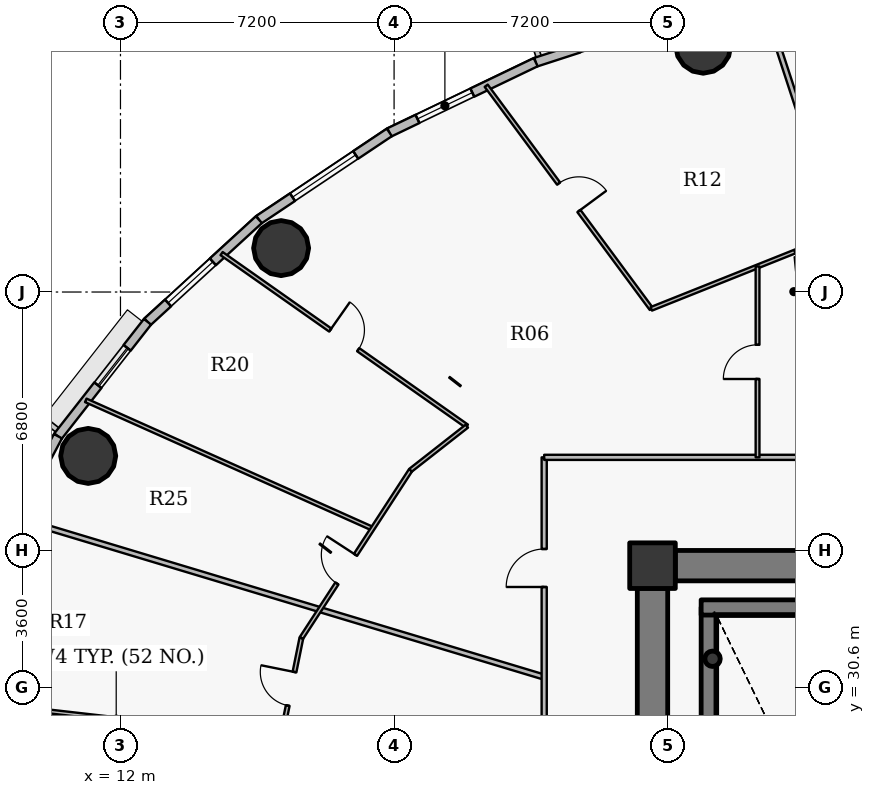
"""IFC4 building model, lengths in metres.
Left out: names, types, materials, properties, quantities, classifications, styles, units other than length and angle.
Written with IfcOpenShell. Run it as: python <this file> out.ifc"""

import sys

from ifc_helpers import new_model, si_unit, direction, frame, frame_2d, origin, origin_2d, place, context, subcontext, project, spatial, rectangle, hollow_circle, extrude, source, transform, mapped, element, fill, save


model = new_model("IFC4")
c1 = context("Model", 3, precision=1e-05, world=origin(), true_north=direction((0.0, 1.0)))
c2 = subcontext(c1, "Body", "Model", "MODEL_VIEW")
j1 = project(units=[si_unit("LENGTHUNIT", "METRE"), si_unit("PLANEANGLEUNIT", "RADIAN")], contexts=[c1])
p1 = place(None, origin())
s1 = spatial("IfcSite", under=j1, at=p1, CompositionType="ELEMENT")
p2 = place(p1, origin())
s2 = spatial("IfcBuilding", under=s1, at=p2, CompositionType="ELEMENT")
p3 = place(p2, frame((0.0, 0.0, 112.2)))
s3 = spatial("IfcBuildingStorey", under=s2, at=p3, CompositionType="ELEMENT", Elevation=112.2)
p4 = place(p3, frame((26.0, 33.8, 0.0), z_axis=(0.0, 0.0, 1.0), x_axis=(1.0, 0.0, 0.0)))
e1 = element("IfcColumn", 1, at=p4, inside=s3, PredefinedType="COLUMN", context=c2, shape_type="SweptSolid", body=[
    extrude(rectangle(XDim=1.2, YDim=1.2, at=origin_2d()), origin(), (0.0, 0.0, 1.0), 3.75),
])
p5 = place(p3, frame((27.48, 24.1, 0.0), z_axis=(0.0, 0.0, 1.0), x_axis=(0.0, 1.0, 0.0)))
e2 = element("IfcWall", 2, at=p5, inside=s3, PredefinedType="SHEAR", context=c2, shape_type="SweptSolid", body=[
    extrude(rectangle(XDim=8.6, YDim=0.4, at=frame_2d((4.3, 0.0))), origin(), (0.0, 0.0, 1.0), 3.75),
])
p6 = place(p3, frame((27.28, 32.7, 0.0), z_axis=(0.0, 0.0, 1.0), x_axis=(1.0, 0.0, 0.0)))
e3 = element("IfcWall", 3, at=p6, inside=s3, PredefinedType="SHEAR", context=c2, shape_type="SweptSolid", body=[
    extrude(rectangle(XDim=4.1, YDim=0.4, at=frame_2d((2.05, 0.0))), origin(), (0.0, 0.0, 1.0), 3.75),
])
p7 = place(p3, frame((27.58, 31.35, 0.0), z_axis=(0.0, 0.0, 1.0), x_axis=(1.0, 0.0, 0.0)))
e4 = element("IfcColumn", 4, at=p7, inside=s3, PredefinedType="COLUMN", context=c2, shape_type="SweptSolid", body=[
    extrude(hollow_circle(Radius=0.203, WallThickness=0.016, at=origin_2d()), origin(), (0.0, 0.0, 1.0), 3.75),
])
p8 = place(p3, frame((26.6, 33.8, 0.0), z_axis=(0.0, 0.0, 1.0), x_axis=(1.0, 0.0, 0.0)))
e5 = element("IfcWall", 5, at=p8, inside=s3, PredefinedType="SHEAR", context=c2, shape_type="SweptSolid", body=[
    extrude(rectangle(XDim=18.8, YDim=0.8, at=frame_2d((9.4, 0.0))), origin(), (0.0, 0.0, 1.0), 2.95),
])
p9 = place(p3, frame((26.0, 20.8, 0.0), z_axis=(0.0, 0.0, 1.0), x_axis=(0.0, 1.0, 0.0)))
e6 = element("IfcWall", 6, at=p9, inside=s3, PredefinedType="SHEAR", context=c2, shape_type="SweptSolid", body=[
    extrude(rectangle(XDim=12.4, YDim=0.8, at=frame_2d((6.2, 0.0))), origin(), (0.0, 0.0, 1.0), 2.95),
])
p10 = place(p9, frame((5.79, 0.0, 0.0)))
e7 = element("IfcOpeningElement", 7, at=p10, cuts=e6, PredefinedType="OPENING", context=c2, shape_type="SweptSolid", body=[
    extrude(rectangle(XDim=0.82, YDim=2.1, at=origin_2d()), frame((0.41, 0.41, 1.05), z_axis=(0.0, -1.0, 0.0), x_axis=(1.0, 0.0, 0.0)), (0.0, 0.0, 1.0), 0.82),
])
for number, where, z_axis, x_axis in (
    (8, (27.334, 47.481, 0.0), (0.0, 0.0, 1.0), (1.0, 0.0, 0.0)),
    (9, (16.227, 42.156, 0.0), (0.0, 0.0, 1.0), (1.0, 0.0, 0.0)),
    (10, (11.151, 36.688, 0.0), (0.0, 0.0, 1.0), (1.0, 0.0, 0.0)),
):
    element("IfcColumn", number, at=place(p3, frame(where, z_axis=z_axis, x_axis=x_axis)), inside=s3, PredefinedType="COLUMN", context=c2, shape_type="SweptSolid", body=[
        extrude(hollow_circle(Radius=0.725, WallThickness=0.042, at=origin_2d()), origin(), (0.0, 0.0, 1.0), 3.75),
    ])
p11 = place(p3, frame((22.926, 47.047, 0.0), z_axis=(0.0, 0.0, 1.0), x_axis=(0.951211346073, 0.308540070495, 0.0)))
e11 = element("IfcWall", 11, at=p11, inside=s3, PredefinedType="SOLIDWALL", context=c2, shape_type="SweptSolid", body=[
    extrude(rectangle(XDim=4.388, YDim=0.24, at=frame_2d((2.194, 0.0))), origin(), (0.0, 0.0, 1.0), 3.5),
])
p12 = place(p11, frame((1.194, 0.0, 0.9)))
e12 = element("IfcOpeningElement", 12, at=p12, cuts=e11, PredefinedType="OPENING", context=c2, shape_type="SweptSolid", body=[
    extrude(rectangle(XDim=2.0, YDim=1.75, at=origin_2d()), frame((1.0, 0.13, 0.875), z_axis=(0.0, -1.0, 0.0), x_axis=(1.0, 0.0, 0.0)), (0.0, 0.0, 1.0), 0.26),
])
p13 = place(p3, frame((19.075, 45.199, 0.0), z_axis=(0.0, 0.0, 1.0), x_axis=(0.901589935876, 0.432591709962, 0.0)))
e13 = element("IfcWall", 13, at=p13, inside=s3, PredefinedType="SOLIDWALL", context=c2, shape_type="SweptSolid", body=[
    extrude(rectangle(XDim=4.272, YDim=0.24, at=frame_2d((2.136, 0.0))), origin(), (0.0, 0.0, 1.0), 3.5),
])
p14 = place(p13, frame((0.822, 0.0, 0.9)))
e14 = element("IfcOpeningElement", 14, at=p14, cuts=e13, PredefinedType="OPENING", context=c2, shape_type="SweptSolid", body=[
    extrude(rectangle(XDim=1.6, YDim=1.75, at=origin_2d()), frame((0.8, 0.13, 0.875), z_axis=(0.0, -1.0, 0.0), x_axis=(1.0, 0.0, 0.0)), (0.0, 0.0, 1.0), 0.26),
])
p15 = place(p3, frame((15.642, 42.903, 0.0), z_axis=(0.0, 0.0, 1.0), x_axis=(0.831221811447, 0.555940914284, 0.0)))
e15 = element("IfcWall", 15, at=p15, inside=s3, PredefinedType="SOLIDWALL", context=c2, shape_type="SweptSolid", body=[
    extrude(rectangle(XDim=4.13, YDim=0.24, at=frame_2d((2.065, 0.0))), origin(), (0.0, 0.0, 1.0), 3.5),
])
p16 = place(p15, frame((1.065, 0.0, 0.9)))
e16 = element("IfcOpeningElement", 16, at=p16, cuts=e15, PredefinedType="OPENING", context=c2, shape_type="SweptSolid", body=[
    extrude(rectangle(XDim=2.0, YDim=1.75, at=origin_2d()), frame((1.0, 0.13, 0.875), z_axis=(0.0, -1.0, 0.0), x_axis=(1.0, 0.0, 0.0)), (0.0, 0.0, 1.0), 0.26),
])
p17 = place(p3, frame((12.711, 40.217, 0.0), z_axis=(0.0, 0.0, 1.0), x_axis=(0.737113356241, 0.675769117414, 0.0)))
e17 = element("IfcWall", 17, at=p17, inside=s3, PredefinedType="SOLIDWALL", context=c2, shape_type="SweptSolid", body=[
    extrude(rectangle(XDim=3.976, YDim=0.24, at=frame_2d((1.988, 0.0))), origin(), (0.0, 0.0, 1.0), 3.5),
])
p18 = place(p17, frame((0.734, 0.0, 0.9)))
e18 = element("IfcOpeningElement", 18, at=p18, cuts=e17, PredefinedType="OPENING", context=c2, shape_type="SweptSolid", body=[
    extrude(rectangle(XDim=1.6, YDim=1.75, at=origin_2d()), frame((0.8, 0.13, 0.875), z_axis=(0.0, -1.0, 0.0), x_axis=(1.0, 0.0, 0.0)), (0.0, 0.0, 1.0), 0.26),
])
p19 = place(p3, frame((10.355, 37.206, 0.0), z_axis=(0.0, 0.0, 1.0), x_axis=(0.616272103517, 0.787533297345, 0.0)))
e19 = element("IfcWall", 19, at=p19, inside=s3, PredefinedType="SOLIDWALL", context=c2, shape_type="SweptSolid", body=[
    extrude(rectangle(XDim=3.823, YDim=0.24, at=frame_2d((1.912, 0.0))), origin(), (0.0, 0.0, 1.0), 3.5),
])
p20 = place(p19, frame((1.705, 0.0, 0.9)))
e20 = element("IfcOpeningElement", 20, at=p20, cuts=e19, PredefinedType="OPENING", context=c2, shape_type="SweptSolid", body=[
    extrude(rectangle(XDim=1.25, YDim=1.65, at=origin_2d()), frame((0.625, 0.13, 0.825), z_axis=(0.0, -1.0, 0.0), x_axis=(1.0, 0.0, 0.0)), (0.0, 0.0, 1.0), 0.26),
])
p21 = place(p3, frame((8.63, 33.945, 0.0), z_axis=(0.0, 0.0, 1.0), x_axis=(0.467614004126, 0.883932770716, 0.0)))
e21 = element("IfcWall", 21, at=p21, inside=s3, PredefinedType="SOLIDWALL", context=c2, shape_type="SweptSolid", body=[
    extrude(rectangle(XDim=3.689, YDim=0.24, at=frame_2d((1.844, 0.0))), origin(), (0.0, 0.0, 1.0), 3.5),
])
p22 = place(p3, frame((7.548, 30.259, 0.0), z_axis=(0.0, 0.0, 1.0), x_axis=(0.993502465776, -0.11381059044, 0.0)))
e22 = element("IfcWall", 22, at=p22, inside=s3, PredefinedType="PARTITIONING", context=c2, shape_type="SweptSolid", body=[
    extrude(rectangle(XDim=8.737, YDim=0.1, at=frame_2d((4.369, 0.0))), origin(), (0.0, 0.0, 1.0), 2.935),
])
p23 = place(p3, frame((9.215, 35.062, 0.0), z_axis=(0.0, 0.0, 1.0), x_axis=(0.957569176287, -0.288203526393, 0.0)))
e23 = element("IfcWall", 23, at=p23, inside=s3, PredefinedType="PARTITIONING", context=c2, shape_type="SweptSolid", body=[
    extrude(rectangle(XDim=14.552, YDim=0.135, at=frame_2d((7.276, 0.0))), origin(), (0.0, 0.0, 1.0), 2.935),
])
p24 = place(p3, frame((11.087, 38.15, 0.0), z_axis=(0.0, 0.0, 1.0), x_axis=(0.912756243594, -0.408504638627, 0.0)))
e24 = element("IfcWall", 24, at=p24, inside=s3, PredefinedType="PARTITIONING", context=c2, shape_type="SweptSolid", body=[
    extrude(rectangle(XDim=8.267, YDim=0.1, at=frame_2d((4.133, 0.0))), origin(), (0.0, 0.0, 1.0), 2.935),
])
p25 = place(p3, frame((14.661, 42.011, 0.0), z_axis=(0.0, 0.0, 1.0), x_axis=(0.817899711196, -0.575360810645, 0.0)))
e25 = element("IfcWall", 25, at=p25, inside=s3, PredefinedType="PARTITIONING", context=c2, shape_type="SweptSolid", body=[
    extrude(rectangle(XDim=7.891, YDim=0.1, at=frame_2d((3.945, 0.0))), origin(), (0.0, 0.0, 1.0), 2.935),
])
p26 = place(p25, frame((3.495, 0.0, 0.0)))
e26 = element("IfcOpeningElement", 26, at=p26, cuts=e25, PredefinedType="OPENING", context=c2, shape_type="SweptSolid", body=[
    extrude(rectangle(XDim=0.9, YDim=2.1, at=origin_2d()), frame((0.45, 0.06, 1.05), z_axis=(0.0, -1.0, 0.0), x_axis=(1.0, 0.0, 0.0)), (0.0, 0.0, 1.0), 0.12),
])
p27 = place(p3, frame((15.77, 27.0, 0.0), z_axis=(0.0, 0.0, 1.0), x_axis=(0.19822142127, 0.980157267049, 0.0)))
e27 = element("IfcWall", 27, at=p27, inside=s3, PredefinedType="PARTITIONING", context=c2, shape_type="SweptSolid", body=[
    extrude(rectangle(XDim=4.994, YDim=0.1, at=frame_2d((2.497, 0.0))), origin(), (0.0, 0.0, 1.0), 2.935),
])
p28 = place(p27, frame((3.183, 0.0, 0.0)))
e28 = element("IfcOpeningElement", 28, at=p28, cuts=e27, PredefinedType="OPENING", context=c2, shape_type="SweptSolid", body=[
    extrude(rectangle(XDim=0.9, YDim=2.1, at=origin_2d()), frame((0.45, 0.06, 1.05), z_axis=(0.0, -1.0, 0.0), x_axis=(1.0, 0.0, 0.0)), (0.0, 0.0, 1.0), 0.12),
])
p29 = place(p27, frame((0.725, 0.0, 0.0)))
e29 = element("IfcOpeningElement", 29, at=p29, cuts=e27, PredefinedType="OPENING", context=c2, shape_type="SweptSolid", body=[
    extrude(rectangle(XDim=0.9, YDim=2.1, at=origin_2d()), frame((0.45, 0.06, 1.05), z_axis=(0.0, -1.0, 0.0), x_axis=(1.0, 0.0, 0.0)), (0.0, 0.0, 1.0), 0.12),
])
p30 = place(p3, frame((16.76, 31.895, 0.0), z_axis=(0.0, 0.0, 1.0), x_axis=(0.545405249109, 0.838172484781, 0.0)))
e30 = element("IfcWall", 30, at=p30, inside=s3, PredefinedType="PARTITIONING", context=c2, shape_type="SweptSolid", body=[
    extrude(rectangle(XDim=5.269, YDim=0.1, at=frame_2d((2.634, 0.0))), origin(), (0.0, 0.0, 1.0), 2.935),
])
p31 = place(p30, frame((1.713, 0.0, 0.0)))
e31 = element("IfcOpeningElement", 31, at=p31, cuts=e30, PredefinedType="OPENING", context=c2, shape_type="SweptSolid", body=[
    extrude(rectangle(XDim=0.9, YDim=2.1, at=origin_2d()), frame((0.45, 0.06, 1.05), z_axis=(0.0, -1.0, 0.0), x_axis=(1.0, 0.0, 0.0)), (0.0, 0.0, 1.0), 0.12),
])
p32 = place(p3, frame((19.634, 36.311, 0.0), z_axis=(0.0, 0.0, 1.0), x_axis=(0.787307829703, 0.616560119768, 0.0)))
e32 = element("IfcWall", 32, at=p32, inside=s3, PredefinedType="PARTITIONING", context=c2, shape_type="SweptSolid", body=[
    extrude(rectangle(XDim=1.882, YDim=0.1, at=frame_2d((0.941, 0.0))), origin(), (0.0, 0.0, 1.0), 3.5),
])
p33 = place(p3, frame((21.624, 46.428, 0.0), z_axis=(0.0, 0.0, 1.0), x_axis=(0.594804555611, -0.803870350631, 0.0)))
e33 = element("IfcWall", 33, at=p33, inside=s3, PredefinedType="PARTITIONING", context=c2, shape_type="SweptSolid", body=[
    extrude(rectangle(XDim=7.303, YDim=0.1, at=frame_2d((3.652, 0.0))), origin(), (0.0, 0.0, 1.0), 2.935),
])
p34 = place(p33, frame((3.202, 0.0, 0.0)))
e34 = element("IfcOpeningElement", 34, at=p34, cuts=e33, PredefinedType="OPENING", context=c2, shape_type="SweptSolid", body=[
    extrude(rectangle(XDim=0.9, YDim=2.1, at=origin_2d()), frame((0.45, 0.06, 1.05), z_axis=(0.0, -1.0, 0.0), x_axis=(1.0, 0.0, 0.0)), (0.0, 0.0, 1.0), 0.12),
])
p35 = place(p3, frame((23.15, 17.35, 0.0), z_axis=(0.0, 0.0, 1.0), x_axis=(0.0, 1.0, 0.0)))
e35 = element("IfcWall", 35, at=p35, inside=s3, PredefinedType="PARTITIONING", context=c2, shape_type="SweptSolid", body=[
    extrude(rectangle(XDim=19.3, YDim=0.135, at=frame_2d((9.65, 0.0))), origin(), (0.0, 0.0, 1.0), 2.935),
])
p36 = place(p35, frame((15.889, 0.0, 0.0)))
e36 = element("IfcOpeningElement", 36, at=p36, cuts=e35, PredefinedType="OPENING", context=c2, shape_type="SweptSolid", body=[
    extrude(rectangle(XDim=1.0, YDim=2.15, at=origin_2d()), frame((0.5, 0.078, 1.075), z_axis=(0.0, -1.0, 0.0), x_axis=(1.0, 0.0, 0.0)), (0.0, 0.0, 1.0), 0.155),
])
p37 = place(p35, frame((6.279, 0.0, 0.0)))
e37 = element("IfcOpeningElement", 37, at=p37, cuts=e35, PredefinedType="OPENING", context=c2, shape_type="SweptSolid", body=[
    extrude(rectangle(XDim=1.0, YDim=2.15, at=origin_2d()), frame((0.5, 0.078, 1.075), z_axis=(0.0, -1.0, 0.0), x_axis=(1.0, 0.0, 0.0)), (0.0, 0.0, 1.0), 0.155),
])
p38 = place(p3, frame((23.15, 36.65, 0.0), z_axis=(0.0, 0.0, 1.0), x_axis=(1.0, 0.0, 0.0)))
e38 = element("IfcWall", 38, at=p38, inside=s3, PredefinedType="PARTITIONING", context=c2, shape_type="SweptSolid", body=[
    extrude(rectangle(XDim=10.373, YDim=0.135, at=frame_2d((5.187, 0.0))), origin(), (0.0, 0.0, 1.0), 2.935),
])
p39 = place(p3, frame((25.968, 40.557, 0.0), z_axis=(0.0, 0.0, 1.0), x_axis=(0.928807252466, 0.37056320347, 0.0)))
e39 = element("IfcWall", 39, at=p39, inside=s3, PredefinedType="PARTITIONING", context=c2, shape_type="SweptSolid", body=[
    extrude(rectangle(XDim=4.07, YDim=0.1, at=frame_2d((2.035, 0.0))), origin(), (0.0, 0.0, 1.0), 2.935),
])
p40 = place(p3, frame((28.764, 36.65, 0.0), z_axis=(0.0, 0.0, 1.0), x_axis=(0.0, 1.0, 0.0)))
e40 = element("IfcWall", 40, at=p40, inside=s3, PredefinedType="PARTITIONING", context=c2, shape_type="SweptSolid", body=[
    extrude(rectangle(XDim=5.023, YDim=0.1, at=frame_2d((2.511, 0.0))), origin(), (0.0, 0.0, 1.0), 3.5),
])
p41 = place(p40, frame((2.062, 0.0, 0.0)))
e41 = element("IfcOpeningElement", 41, at=p41, cuts=e40, PredefinedType="OPENING", context=c2, shape_type="SweptSolid", body=[
    extrude(rectangle(XDim=0.9, YDim=2.1, at=origin_2d()), frame((0.45, 0.06, 1.05), z_axis=(0.0, -1.0, 0.0), x_axis=(1.0, 0.0, 0.0)), (0.0, 0.0, 1.0), 0.12),
])
p42 = place(p3, frame((28.883, 48.741, 0.0), z_axis=(0.0, 0.0, 1.0), x_axis=(0.311090320612, -0.95038035145, 0.0)))
e42 = element("IfcWall", 42, at=p42, inside=s3, PredefinedType="PARTITIONING", context=c2, shape_type="SweptSolid", body=[
    extrude(rectangle(XDim=12.671, YDim=0.135, at=frame_2d((6.335, 0.0))), origin(), (0.0, 0.0, 1.0), 2.935),
])
p43 = place(p3, frame((29.749, 42.066, 0.0), z_axis=(0.0, 0.0, 1.0), x_axis=(0.992395485088, 0.123090215599, 0.0)))
e43 = element("IfcWall", 43, at=p43, inside=s3, PredefinedType="PARTITIONING", context=c2, shape_type="SweptSolid", body=[
    extrude(rectangle(XDim=6.299, YDim=0.1, at=frame_2d((3.15, 0.0))), origin(), (0.0, 0.0, 1.0), 2.935),
])
p44 = place(p3, frame((26.59, 34.2, 0.0), z_axis=(0.0, 0.0, 1.0), x_axis=(-1.0, 0.0, 0.0)))
e44 = element("IfcWall", 44, at=p44, inside=s3, PredefinedType="PARTITIONING", context=c2, shape_type="SweptSolid", body=[
    extrude(rectangle(XDim=0.99, YDim=0.135, at=frame_2d((0.495, 0.0))), origin(), (0.0, 0.0, 1.0), 2.935),
])
p45 = place(p3, frame((25.6, 33.893, 0.0), z_axis=(0.0, 0.0, 1.0), x_axis=(0.0, -1.0, 0.0)))
e45 = element("IfcWall", 45, at=p45, inside=s3, PredefinedType="PARTITIONING", context=c2, shape_type="SweptSolid", body=[
    extrude(rectangle(XDim=0.683, YDim=0.135, at=frame_2d((0.341, 0.0))), origin(), (0.0, 0.0, 1.0), 3.5),
])
m1 = source(origin(), c2, "Body", "SweptSolid", [
    extrude(rectangle(XDim=1.6, YDim=1.75, at=origin_2d()), frame((0.8, 0.03, 0.875), z_axis=(0.0, -1.0, 0.0), x_axis=(1.0, 0.0, 0.0)), (0.0, 0.0, 1.0), 0.06),
])
p46 = place(p14, origin())
e46 = element("IfcWindow", 46, at=p46, inside=s3, PartitioningType="DOUBLE_PANEL_VERTICAL", PredefinedType="WINDOW", context=c2, shape_type="MappedRepresentation", body=[
    mapped(m1, transform((0.0, 0.0, 0.0), x_axis=(1.0, 0.0, 0.0), y_axis=(0.0, 1.0, 0.0), z_axis=(0.0, 0.0, 1.0), scale=1.0)),
])
fill(e14, e46)
m2 = source(origin(), c2, "Body", "SweptSolid", [
    extrude(rectangle(XDim=2.0, YDim=1.75, at=origin_2d()), frame((1.0, 0.03, 0.875), z_axis=(0.0, -1.0, 0.0), x_axis=(1.0, 0.0, 0.0)), (0.0, 0.0, 1.0), 0.06),
])
p47 = place(p16, origin())
e47 = element("IfcWindow", 47, at=p47, inside=s3, PartitioningType="DOUBLE_PANEL_VERTICAL", PredefinedType="WINDOW", context=c2, shape_type="MappedRepresentation", body=[
    mapped(m2, transform((0.0, 0.0, 0.0), x_axis=(1.0, 0.0, 0.0), y_axis=(0.0, 1.0, 0.0), z_axis=(0.0, 0.0, 1.0), scale=1.0)),
])
fill(e16, e47)
p48 = place(p18, origin())
e48 = element("IfcWindow", 48, at=p48, inside=s3, PartitioningType="DOUBLE_PANEL_VERTICAL", PredefinedType="WINDOW", context=c2, shape_type="MappedRepresentation", body=[
    mapped(m1, transform((0.0, 0.0, 0.0), x_axis=(1.0, 0.0, 0.0), y_axis=(0.0, 1.0, 0.0), z_axis=(0.0, 0.0, 1.0), scale=1.0)),
])
fill(e18, e48)
m3 = source(origin(), c2, "Body", "SweptSolid", [
    extrude(rectangle(XDim=1.25, YDim=1.65, at=origin_2d()), frame((0.625, 0.03, 0.825), z_axis=(0.0, -1.0, 0.0), x_axis=(1.0, 0.0, 0.0)), (0.0, 0.0, 1.0), 0.06),
])
p49 = place(p20, origin())
e49 = element("IfcWindow", 49, at=p49, inside=s3, PartitioningType="SINGLE_PANEL", PredefinedType="WINDOW", context=c2, shape_type="MappedRepresentation", body=[
    mapped(m3, transform((0.0, 0.0, 0.0), x_axis=(1.0, 0.0, 0.0), y_axis=(0.0, 1.0, 0.0), z_axis=(0.0, 0.0, 1.0), scale=1.0)),
])
fill(e20, e49)
m4 = source(origin(), c2, "Body", "SweptSolid", [
    extrude(rectangle(XDim=1.0, YDim=2.15, at=origin_2d()), frame((0.5, 0.025, 1.075), z_axis=(0.0, -1.0, 0.0), x_axis=(1.0, 0.0, 0.0)), (0.0, 0.0, 1.0), 0.05),
])
p50 = place(p36, origin())
e50 = element("IfcDoor", 50, at=p50, inside=s3, OperationType="SINGLE_SWING_LEFT", PredefinedType="DOOR", context=c2, shape_type="MappedRepresentation", body=[
    mapped(m4, transform((0.0, 0.0, 0.0), x_axis=(1.0, 0.0, 0.0), y_axis=(0.0, 1.0, 0.0), z_axis=(0.0, 0.0, 1.0), scale=1.0)),
])
fill(e36, e50)
m5 = source(origin(), c2, "Body", "SweptSolid", [
    extrude(rectangle(XDim=0.9, YDim=2.1, at=origin_2d()), frame((0.45, 0.025, 1.05), z_axis=(0.0, -1.0, 0.0), x_axis=(1.0, 0.0, 0.0)), (0.0, 0.0, 1.0), 0.05),
])
p51 = place(p34, origin())
e51 = element("IfcDoor", 51, at=p51, inside=s3, OperationType="SINGLE_SWING_RIGHT", PredefinedType="DOOR", context=c2, shape_type="MappedRepresentation", body=[
    mapped(m5, transform((0.0, 0.0, 0.0), x_axis=(1.0, 0.0, 0.0), y_axis=(0.0, 1.0, 0.0), z_axis=(0.0, 0.0, 1.0), scale=1.0)),
])
fill(e34, e51)
p52 = place(p26, origin())
e52 = element("IfcDoor", 52, at=p52, inside=s3, OperationType="SINGLE_SWING_LEFT", PredefinedType="DOOR", context=c2, shape_type="MappedRepresentation", body=[
    mapped(m5, transform((0.0, 0.0, 0.0), x_axis=(1.0, 0.0, 0.0), y_axis=(0.0, 1.0, 0.0), z_axis=(0.0, 0.0, 1.0), scale=1.0)),
])
fill(e26, e52)
p53 = place(p31, origin())
e53 = element("IfcDoor", 53, at=p53, inside=s3, OperationType="SINGLE_SWING_RIGHT", PredefinedType="DOOR", context=c2, shape_type="MappedRepresentation", body=[
    mapped(m5, transform((0.0, 0.0, 0.0), x_axis=(1.0, 0.0, 0.0), y_axis=(0.0, 1.0, 0.0), z_axis=(0.0, 0.0, 1.0), scale=1.0)),
])
fill(e31, e53)
p54 = place(p41, origin())
e54 = element("IfcDoor", 54, at=p54, inside=s3, OperationType="SINGLE_SWING_LEFT", PredefinedType="DOOR", context=c2, shape_type="MappedRepresentation", body=[
    mapped(m5, transform((0.0, 0.0, 0.0), x_axis=(1.0, 0.0, 0.0), y_axis=(0.0, 1.0, 0.0), z_axis=(0.0, 0.0, 1.0), scale=1.0)),
])
fill(e41, e54)
p55 = place(p28, origin())
e55 = element("IfcDoor", 55, at=p55, inside=s3, OperationType="SINGLE_SWING_RIGHT", PredefinedType="DOOR", context=c2, shape_type="MappedRepresentation", body=[
    mapped(m5, transform((0.0, 0.0, 0.0), x_axis=(1.0, 0.0, 0.0), y_axis=(0.0, 1.0, 0.0), z_axis=(0.0, 0.0, 1.0), scale=1.0)),
])
fill(e28, e55)
save(model, sys.argv[1])
